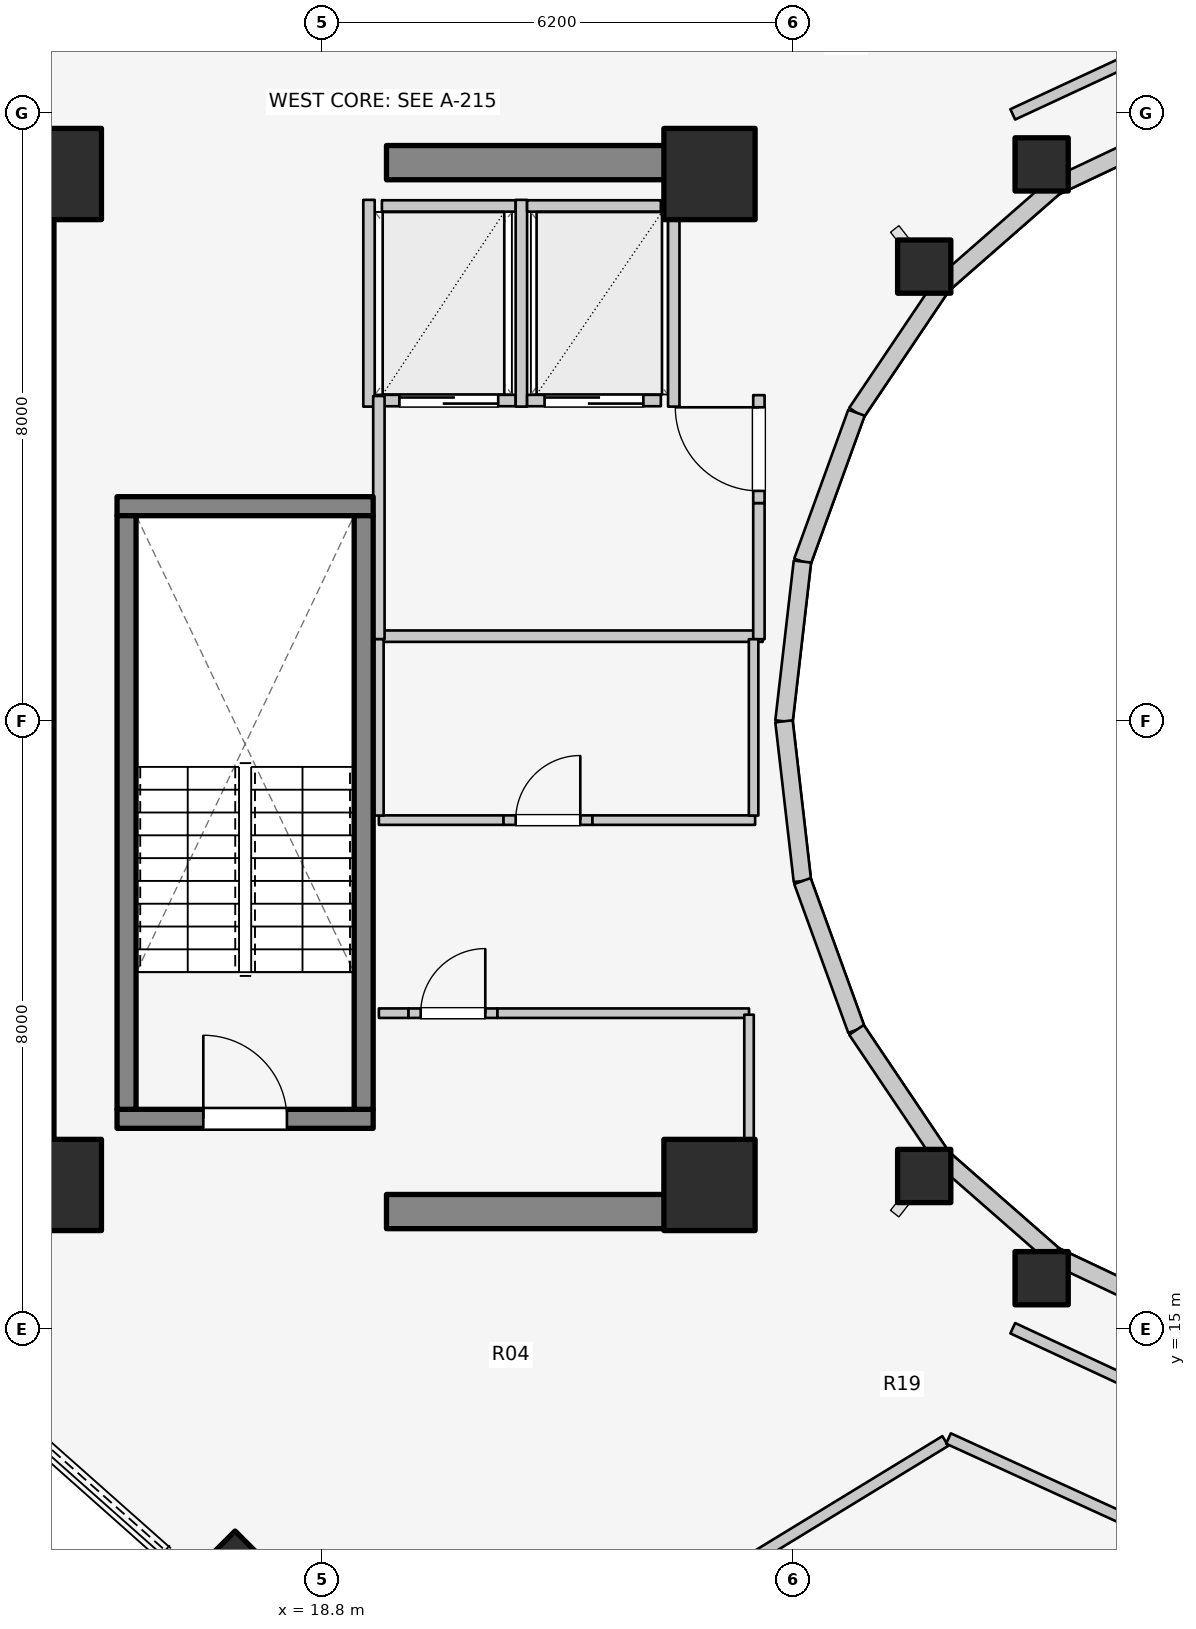
"""IFC4 building model, lengths in metres.
Left out: names, types, materials, properties, quantities, classifications, styles, units other than length and angle.
Written with IfcOpenShell. Run it as: python <this file> out.ifc"""

import sys

from ifc_helpers import new_model, si_unit, direction, frame, frame_2d, origin, origin_2d, place, context, subcontext, project, spatial, rectangle, i_section, extrude, element, fill, save


model = new_model("IFC4")
c1 = context("Model", 3, precision=1e-05, world=origin(), true_north=direction((0.0, 1.0)))
c2 = subcontext(c1, "Body", "Model", "MODEL_VIEW")
j1 = project(units=[si_unit("LENGTHUNIT", "METRE"), si_unit("PLANEANGLEUNIT", "RADIAN")], contexts=[c1])
p1 = place(None, origin())
s1 = spatial("IfcSite", under=j1, at=p1, CompositionType="ELEMENT")
p2 = place(p1, origin())
s2 = spatial("IfcBuilding", under=s1, at=p2, CompositionType="ELEMENT")
p3 = place(p2, frame((0.0, 0.0, 263.6)))
s3 = spatial("IfcBuildingStorey", under=s2, at=p3, CompositionType="ELEMENT", Elevation=263.6)
p4 = place(p3, frame((15.05, 17.05, 0.0), z_axis=(0.0, 0.0, 1.0), x_axis=(0.0, 1.0, 0.0)))
e1 = element("IfcWall", 1, at=p4, inside=s3, PredefinedType="SHEAR", context=c2, shape_type="SweptSolid", body=[
    extrude(rectangle(XDim=12.8, YDim=0.45, at=frame_2d((6.4, 0.0))), origin(), (0.0, 0.0, 1.0), 3.2),
])
for number, where, z_axis, x_axis in (
    (2, (19.65, 16.55, 0.0), (0.0, 0.0, 1.0), (1.0, 0.0, 0.0)),
    (3, (19.65, 30.35, 0.0), (0.0, 0.0, 1.0), (1.0, 0.0, 0.0)),
):
    element("IfcWall", number, at=place(p3, frame(where, z_axis=z_axis, x_axis=x_axis)), inside=s3, PredefinedType="SHEAR", context=c2, shape_type="SweptSolid", body=[
        extrude(rectangle(XDim=4.5, YDim=0.45, at=frame_2d((2.25, 0.0))), origin(), (0.0, 0.0, 1.0), 3.2),
    ])
p5 = place(p3, frame((16.105, 17.77, 0.0), z_axis=(0.0, 0.0, 1.0), x_axis=(1.0, 0.0, 0.0)))
e4 = element("IfcWall", 4, at=p5, inside=s3, PredefinedType="SOLIDWALL", context=c2, shape_type="SweptSolid", body=[
    extrude(rectangle(XDim=3.37, YDim=0.25, at=frame_2d((1.685, 0.0))), origin(), (0.0, 0.0, 1.0), 3.2),
])
p6 = place(p5, frame((1.135, 0.0, 0.0)))
e5 = element("IfcOpeningElement", 5, at=p6, cuts=e4, PredefinedType="OPENING", context=c2, shape_type="SweptSolid", body=[
    extrude(rectangle(XDim=1.1, YDim=2.1, at=frame_2d((0.55, 1.05))), frame((0.0, 0.135, 0.0), z_axis=(0.0, -1.0, 0.0), x_axis=(1.0, 0.0, 0.0)), (0.0, 0.0, 1.0), 0.27),
])
p7 = place(p3, frame((16.105, 25.83, 0.0), z_axis=(0.0, 0.0, 1.0), x_axis=(1.0, 0.0, 0.0)))
e6 = element("IfcWall", 6, at=p7, inside=s3, PredefinedType="SOLIDWALL", context=c2, shape_type="SweptSolid", body=[
    extrude(rectangle(XDim=3.37, YDim=0.25, at=frame_2d((1.685, 0.0))), origin(), (0.0, 0.0, 1.0), 3.2),
])
for number, where, z_axis, x_axis in (
    (7, (16.23, 17.895, 0.0), (0.0, 0.0, 1.0), (0.0, 1.0, 0.0)),
    (8, (19.35, 17.895, 0.0), (0.0, 0.0, 1.0), (0.0, 1.0, 0.0)),
):
    element("IfcWall", number, at=place(p3, frame(where, z_axis=z_axis, x_axis=x_axis)), inside=s3, PredefinedType="SOLIDWALL", context=c2, shape_type="SweptSolid", body=[
        extrude(rectangle(XDim=7.81, YDim=0.25, at=frame_2d((3.905, 0.0))), origin(), (0.0, 0.0, 1.0), 3.2),
    ])
for number, where, z_axis, x_axis in (
    (9, (15.3, 16.9, 0.0), (0.0, 0.0, 1.0), (1.0, 0.0, 0.0)),
    (10, (23.9, 16.9, 0.0), (0.0, 0.0, 1.0), (1.0, 0.0, 0.0)),
    (11, (23.9, 30.2, 0.0), (0.0, 0.0, 1.0), (1.0, 0.0, 0.0)),
    (12, (15.3, 30.2, 0.0), (0.0, 0.0, 1.0), (1.0, 0.0, 0.0)),
):
    element("IfcColumn", number, at=place(p3, frame(where, z_axis=z_axis, x_axis=x_axis)), inside=s3, PredefinedType="COLUMN", context=c2, shape_type="SweptSolid", body=[
        extrude(rectangle(XDim=1.2, YDim=1.2, at=origin_2d()), origin(), (0.0, 0.0, 1.0), 3.2),
    ])
for number, where, z_axis, x_axis in (
    (13, (28.27, 30.327, 0.0), (0.0, 0.0, 1.0), (1.0, 0.0, 0.0)),
    (14, (26.725, 28.982, 0.0), (0.0, 0.0, 1.0), (1.0, 0.0, 0.0)),
    (15, (26.725, 17.018, 0.0), (0.0, 0.0, 1.0), (1.0, 0.0, 0.0)),
):
    element("IfcColumn", number, at=place(p3, frame(where, z_axis=z_axis, x_axis=x_axis)), inside=s3, PredefinedType="COLUMN", context=c2, shape_type="SweptSolid", body=[
        extrude(rectangle(XDim=0.7, YDim=0.7, at=origin_2d()), origin(), (0.0, 0.0, 1.0), 3.2),
    ])
p8 = place(p3, frame((17.667, 12.048, 0.0), z_axis=(0.0, 0.0, 1.0), x_axis=(-0.707106781187, -0.707106781187, 0.0)))
e16 = element("IfcColumn", 16, at=p8, inside=s3, PredefinedType="COLUMN", context=c2, shape_type="SweptSolid", body=[
    extrude(i_section(OverallWidth=0.412, OverallDepth=0.435, WebThickness=0.036, FlangeThickness=0.057, FilletRadius=0.025, at=origin_2d()), origin(), (0.0, 0.0, 1.0), 3.2),
])
p9 = place(p3, frame((28.27, 15.673, 0.0), z_axis=(0.0, 0.0, 1.0), x_axis=(1.0, 0.0, 0.0)))
e17 = element("IfcColumn", 17, at=p9, inside=s3, PredefinedType="COLUMN", context=c2, shape_type="SweptSolid", body=[
    extrude(rectangle(XDim=0.7, YDim=0.7, at=origin_2d()), origin(), (0.0, 0.0, 1.0), 3.2),
])
p10 = place(p3, frame((30.157, 30.843, 0.0), z_axis=(0.0, 0.0, 1.0), x_axis=(-0.904179699603, -0.427152280606, 0.0)))
e18 = element("IfcWall", 18, at=p10, inside=s3, PredefinedType="STANDARD", context=c2, shape_type="SweptSolid", body=[
    extrude(rectangle(XDim=1.899, YDim=0.23, at=frame_2d((0.95, 0.0))), origin(), (0.0, 0.0, 1.0), 1.32),
])
p11 = place(p3, frame((28.44, 30.032, 0.0), z_axis=(0.0, 0.0, 1.0), x_axis=(-0.752576694707, -0.658504607869, 0.0)))
e19 = element("IfcWall", 19, at=p11, inside=s3, PredefinedType="STANDARD", context=c2, shape_type="SweptSolid", body=[
    extrude(rectangle(XDim=1.959, YDim=0.23, at=frame_2d((0.98, 0.0))), origin(), (0.0, 0.0, 1.0), 1.32),
])
p12 = place(p3, frame((26.965, 28.742, 0.0), z_axis=(0.0, 0.0, 1.0), x_axis=(-0.558197800898, -0.829707909492, 0.0)))
e20 = element("IfcWall", 20, at=p12, inside=s3, PredefinedType="STANDARD", context=c2, shape_type="SweptSolid", body=[
    extrude(rectangle(XDim=2.027, YDim=0.23, at=frame_2d((1.013, 0.0))), origin(), (0.0, 0.0, 1.0), 1.32),
])
p13 = place(p3, frame((25.834, 27.06, 0.0), z_axis=(0.0, 0.0, 1.0), x_axis=(-0.341423187295, -0.93990968033, 0.0)))
e21 = element("IfcWall", 21, at=p13, inside=s3, PredefinedType="STANDARD", context=c2, shape_type="SweptSolid", body=[
    extrude(rectangle(XDim=2.084, YDim=0.23, at=frame_2d((1.042, 0.0))), origin(), (0.0, 0.0, 1.0), 2.9),
])
for number, where, z_axis, x_axis in (
    (22, (25.123, 25.102, 0.0), (0.0, 0.0, 1.0), (-0.115, -0.993, 0.0)),
    (23, (24.88, 23.0, 0.0), (0.0, 0.0, 1.0), (0.115, -0.993, 0.0)),
):
    element("IfcWall", number, at=place(p3, frame(where, z_axis=z_axis, x_axis=x_axis)), inside=s3, PredefinedType="STANDARD", context=c2, shape_type="SweptSolid", body=[
        extrude(rectangle(XDim=2.115, YDim=0.23, at=frame_2d((1.058, 0.0))), origin(), (0.0, 0.0, 1.0), 2.9),
    ])
p14 = place(p3, frame((25.123, 20.898, 0.0), z_axis=(0.0, 0.0, 1.0), x_axis=(0.341423187295, -0.93990968033, 0.0)))
e24 = element("IfcWall", 24, at=p14, inside=s3, PredefinedType="STANDARD", context=c2, shape_type="SweptSolid", body=[
    extrude(rectangle(XDim=2.084, YDim=0.23, at=frame_2d((1.042, 0.0))), origin(), (0.0, 0.0, 1.0), 2.9),
])
p15 = place(p3, frame((25.834, 18.94, 0.0), z_axis=(0.0, 0.0, 1.0), x_axis=(0.558197800898, -0.829707909492, 0.0)))
e25 = element("IfcWall", 25, at=p15, inside=s3, PredefinedType="STANDARD", context=c2, shape_type="SweptSolid", body=[
    extrude(rectangle(XDim=2.027, YDim=0.23, at=frame_2d((1.013, 0.0))), origin(), (0.0, 0.0, 1.0), 1.32),
])
p16 = place(p3, frame((26.965, 17.258, 0.0), z_axis=(0.0, 0.0, 1.0), x_axis=(0.752576694707, -0.658504607869, 0.0)))
e26 = element("IfcWall", 26, at=p16, inside=s3, PredefinedType="STANDARD", context=c2, shape_type="SweptSolid", body=[
    extrude(rectangle(XDim=1.959, YDim=0.23, at=frame_2d((0.98, 0.0))), origin(), (0.0, 0.0, 1.0), 1.32),
])
p17 = place(p3, frame((28.44, 15.968, 0.0), z_axis=(0.0, 0.0, 1.0), x_axis=(0.904179699603, -0.427152280606, 0.0)))
e27 = element("IfcWall", 27, at=p17, inside=s3, PredefinedType="STANDARD", context=c2, shape_type="SweptSolid", body=[
    extrude(rectangle(XDim=1.899, YDim=0.23, at=frame_2d((0.95, 0.0))), origin(), (0.0, 0.0, 1.0), 1.32),
])
p18 = place(p3, frame((17.254, 34.365, 0.0), z_axis=(0.0, 0.0, 1.0), x_axis=(-0.748042849834, -0.663650431185, 0.0)))
e28 = element("IfcWall", 28, at=p18, inside=s3, PredefinedType="STANDARD", context=c2, shape_type="SweptSolid", body=[
    extrude(rectangle(XDim=4.059, YDim=0.26, at=frame_2d((2.029, 0.0))), origin(), (0.0, 0.0, 1.0), 1.32),
])
p19 = place(p3, frame((19.59, 27.22, 0.0), z_axis=(0.0, 0.0, 1.0), x_axis=(1.0, 0.0, 0.0)))
e29 = element("IfcWall", 29, at=p19, inside=s3, PredefinedType="SOLIDWALL", context=c2, shape_type="SweptSolid", body=[
    extrude(rectangle(XDim=1.76, YDim=0.15, at=frame_2d((0.88, 0.0))), origin(), (0.0, 0.0, 1.0), 2.915),
])
p20 = place(p19, frame((0.23, 0.0, 0.0)))
e30 = element("IfcOpeningElement", 30, at=p20, cuts=e29, PredefinedType="OPENING", context=c2, shape_type="SweptSolid", body=[
    extrude(rectangle(XDim=1.3, YDim=2.1, at=frame_2d((0.65, 1.05))), frame((0.0, 0.085, 0.0), z_axis=(0.0, -1.0, 0.0), x_axis=(1.0, 0.0, 0.0)), (0.0, 0.0, 1.0), 0.17),
])
p21 = place(p3, frame((19.59, 29.78, 0.0), z_axis=(0.0, 0.0, 1.0), x_axis=(1.0, 0.0, 0.0)))
e31 = element("IfcWall", 31, at=p21, inside=s3, PredefinedType="SOLIDWALL", context=c2, shape_type="SweptSolid", body=[
    extrude(rectangle(XDim=1.76, YDim=0.15, at=frame_2d((0.88, 0.0))), origin(), (0.0, 0.0, 1.0), 2.915),
])
for number, where, z_axis, x_axis in (
    (32, (19.42, 27.14, 0.0), (0.0, 0.0, 1.0), (0.0, 1.0, 0.0)),
    (33, (21.425, 27.14, 0.0), (0.0, 0.0, 1.0), (0.0, 1.0, 0.0)),
):
    element("IfcWall", number, at=place(p3, frame(where, z_axis=z_axis, x_axis=x_axis)), inside=s3, PredefinedType="SOLIDWALL", context=c2, shape_type="SweptSolid", body=[
        extrude(rectangle(XDim=2.72, YDim=0.15, at=frame_2d((1.36, 0.0))), origin(), (0.0, 0.0, 1.0), 2.915),
    ])
p22 = place(p3, frame((21.5, 27.22, 0.0), z_axis=(0.0, 0.0, 1.0), x_axis=(1.0, 0.0, 0.0)))
e34 = element("IfcWall", 34, at=p22, inside=s3, PredefinedType="SOLIDWALL", context=c2, shape_type="SweptSolid", body=[
    extrude(rectangle(XDim=1.76, YDim=0.15, at=frame_2d((0.88, 0.0))), origin(), (0.0, 0.0, 1.0), 2.915),
])
p23 = place(p22, frame((0.23, 0.0, 0.0)))
e35 = element("IfcOpeningElement", 35, at=p23, cuts=e34, PredefinedType="OPENING", context=c2, shape_type="SweptSolid", body=[
    extrude(rectangle(XDim=1.3, YDim=2.1, at=frame_2d((0.65, 1.05))), frame((0.0, 0.085, 0.0), z_axis=(0.0, -1.0, 0.0), x_axis=(1.0, 0.0, 0.0)), (0.0, 0.0, 1.0), 0.17),
])
p24 = place(p3, frame((21.5, 29.78, 0.0), z_axis=(0.0, 0.0, 1.0), x_axis=(1.0, 0.0, 0.0)))
e36 = element("IfcWall", 36, at=p24, inside=s3, PredefinedType="SOLIDWALL", context=c2, shape_type="SweptSolid", body=[
    extrude(rectangle(XDim=1.76, YDim=0.15, at=frame_2d((0.88, 0.0))), origin(), (0.0, 0.0, 1.0), 2.915),
])
p25 = place(p3, frame((23.43, 27.14, 0.0), z_axis=(0.0, 0.0, 1.0), x_axis=(0.0, 1.0, 0.0)))
e37 = element("IfcWall", 37, at=p25, inside=s3, PredefinedType="SOLIDWALL", context=c2, shape_type="SweptSolid", body=[
    extrude(rectangle(XDim=2.72, YDim=0.15, at=frame_2d((1.36, 0.0))), origin(), (0.0, 0.0, 1.0), 1.57),
])
p26 = place(p3, frame((19.52, 24.12, 0.0), z_axis=(0.0, 0.0, 1.0), x_axis=(1.0, 0.0, 0.0)))
e38 = element("IfcWall", 38, at=p26, inside=s3, PredefinedType="PARTITIONING", context=c2, shape_type="SweptSolid", body=[
    extrude(rectangle(XDim=5.08, YDim=0.15, at=frame_2d((2.54, 0.0))), origin(), (0.0, 0.0, 1.0), 1.57),
])
p27 = place(p3, frame((19.55, 24.08, 0.0), z_axis=(0.0, 0.0, 1.0), x_axis=(0.0, 1.0, 0.0)))
e39 = element("IfcWall", 39, at=p27, inside=s3, PredefinedType="PARTITIONING", context=c2, shape_type="SweptSolid", body=[
    extrude(rectangle(XDim=3.2, YDim=0.15, at=frame_2d((1.6, 0.0))), origin(), (0.0, 0.0, 1.0), 2.915),
])
p28 = place(p3, frame((24.55, 24.08, 0.0), z_axis=(0.0, 0.0, 1.0), x_axis=(0.0, 1.0, 0.0)))
e40 = element("IfcWall", 40, at=p28, inside=s3, PredefinedType="PARTITIONING", context=c2, shape_type="SweptSolid", body=[
    extrude(rectangle(XDim=1.791, YDim=0.15, at=frame_2d((0.896, 0.0))), origin(), (0.0, 0.0, 1.0), 1.57),
])
p29 = place(p3, frame((24.55, 25.871, 0.0), z_axis=(0.0, 0.0, 1.0), x_axis=(0.0, 1.0, 0.0)))
e41 = element("IfcWall", 41, at=p29, inside=s3, PredefinedType="PARTITIONING", context=c2, shape_type="SweptSolid", body=[
    extrude(rectangle(XDim=1.42, YDim=0.15, at=frame_2d((0.71, 0.0))), origin(), (0.0, 0.0, 1.0), 2.16),
])
p30 = place(p29, frame((0.16, 0.0, 0.0)))
e42 = element("IfcOpeningElement", 42, at=p30, cuts=e41, PredefinedType="OPENING", context=c2, shape_type="SweptSolid", body=[
    extrude(rectangle(XDim=1.1, YDim=2.1, at=frame_2d((0.55, 1.05))), frame((0.0, 0.085, 0.0), z_axis=(0.0, -1.0, 0.0), x_axis=(1.0, 0.0, 0.0)), (0.0, 0.0, 1.0), 0.17),
])
p31 = place(p3, frame((19.55, 19.16, 0.0), z_axis=(0.0, 0.0, 1.0), x_axis=(1.0, 0.0, 0.0)))
e43 = element("IfcWall", 43, at=p31, inside=s3, PredefinedType="PARTITIONING", context=c2, shape_type="SweptSolid", body=[
    extrude(rectangle(XDim=0.39, YDim=0.125, at=frame_2d((0.195, 0.0))), origin(), (0.0, 0.0, 1.0), 2.22),
])
p32 = place(p3, frame((19.94, 19.16, 0.0), z_axis=(0.0, 0.0, 1.0), x_axis=(1.0, 0.0, 0.0)))
e44 = element("IfcWall", 44, at=p32, inside=s3, PredefinedType="PARTITIONING", context=c2, shape_type="SweptSolid", body=[
    extrude(rectangle(XDim=1.17, YDim=0.125, at=frame_2d((0.585, 0.0))), origin(), (0.0, 0.0, 1.0), 2.915),
])
p33 = place(p32, frame((0.16, 0.0, 0.0)))
e45 = element("IfcOpeningElement", 45, at=p33, cuts=e44, PredefinedType="OPENING", context=c2, shape_type="SweptSolid", body=[
    extrude(rectangle(XDim=0.85, YDim=2.05, at=frame_2d((0.425, 1.025))), frame((0.0, 0.073, 0.0), z_axis=(0.0, -1.0, 0.0), x_axis=(1.0, 0.0, 0.0)), (0.0, 0.0, 1.0), 0.145),
])
p34 = place(p3, frame((21.11, 19.16, 0.0), z_axis=(0.0, 0.0, 1.0), x_axis=(1.0, 0.0, 0.0)))
e46 = element("IfcWall", 46, at=p34, inside=s3, PredefinedType="PARTITIONING", context=c2, shape_type="SweptSolid", body=[
    extrude(rectangle(XDim=3.31, YDim=0.125, at=frame_2d((1.655, 0.0))), origin(), (0.0, 0.0, 1.0), 1.57),
])
p35 = place(p3, frame((24.42, 17.1, 0.0), z_axis=(0.0, 0.0, 1.0), x_axis=(0.0, 1.0, 0.0)))
e47 = element("IfcWall", 47, at=p35, inside=s3, PredefinedType="PARTITIONING", context=c2, shape_type="SweptSolid", body=[
    extrude(rectangle(XDim=2.04, YDim=0.125, at=frame_2d((1.02, 0.0))), origin(), (0.0, 0.0, 1.0), 1.57),
])
p36 = place(p3, frame((19.55, 21.7, 0.0), z_axis=(0.0, 0.0, 1.0), x_axis=(1.0, 0.0, 0.0)))
e48 = element("IfcWall", 48, at=p36, inside=s3, PredefinedType="PARTITIONING", context=c2, shape_type="SweptSolid", body=[
    extrude(rectangle(XDim=1.64, YDim=0.125, at=frame_2d((0.82, 0.0))), origin(), (0.0, 0.0, 1.0), 2.915),
])
p37 = place(p3, frame((21.19, 21.7, 0.0), z_axis=(0.0, 0.0, 1.0), x_axis=(1.0, 0.0, 0.0)))
e49 = element("IfcWall", 49, at=p37, inside=s3, PredefinedType="PARTITIONING", context=c2, shape_type="SweptSolid", body=[
    extrude(rectangle(XDim=1.17, YDim=0.125, at=frame_2d((0.585, 0.0))), origin(), (0.0, 0.0, 1.0), 2.915),
])
p38 = place(p37, frame((0.16, 0.0, 0.0)))
e50 = element("IfcOpeningElement", 50, at=p38, cuts=e49, PredefinedType="OPENING", context=c2, shape_type="SweptSolid", body=[
    extrude(rectangle(XDim=0.85, YDim=2.05, at=frame_2d((0.425, 1.025))), frame((0.0, 0.073, 0.0), z_axis=(0.0, -1.0, 0.0), x_axis=(1.0, 0.0, 0.0)), (0.0, 0.0, 1.0), 0.145),
])
p39 = place(p3, frame((22.36, 21.7, 0.0), z_axis=(0.0, 0.0, 1.0), x_axis=(1.0, 0.0, 0.0)))
e51 = element("IfcWall", 51, at=p39, inside=s3, PredefinedType="PARTITIONING", context=c2, shape_type="SweptSolid", body=[
    extrude(rectangle(XDim=2.14, YDim=0.125, at=frame_2d((1.07, 0.0))), origin(), (0.0, 0.0, 1.0), 1.57),
])
for number, where, z_axis, x_axis in (
    (52, (19.55, 21.76, 0.0), (0.0, 0.0, 1.0), (0.0, 1.0, 0.0)),
    (53, (24.48, 21.76, 0.0), (0.0, 0.0, 1.0), (0.0, 1.0, 0.0)),
):
    element("IfcWall", number, at=place(p3, frame(where, z_axis=z_axis, x_axis=x_axis)), inside=s3, PredefinedType="PARTITIONING", context=c2, shape_type="SweptSolid", body=[
        extrude(rectangle(XDim=2.32, YDim=0.125, at=frame_2d((1.16, 0.0))), origin(), (0.0, 0.0, 1.0), 2.915),
    ])
for number, where, z_axis, x_axis in (
    (54, (29.873, 31.906, 0.0), (0.0, 0.0, 1.0), (-0.907, -0.421, 0.0)),
    (55, (27.89, 15.015, 0.0), (0.0, 0.0, 1.0), (0.907, -0.421, 0.0)),
):
    element("IfcWall", number, at=place(p3, frame(where, z_axis=z_axis, x_axis=x_axis)), inside=s3, PredefinedType="PARTITIONING", context=c2, shape_type="SweptSolid", body=[
        extrude(rectangle(XDim=2.186, YDim=0.15, at=frame_2d((1.093, 0.0))), origin(), (0.0, 0.0, 1.0), 1.32),
    ])
p40 = place(p3, frame((27.003, 13.531, 0.0), z_axis=(0.0, 0.0, 1.0), x_axis=(-0.853465247428, -0.521149759122, 0.0)))
e56 = element("IfcWall", 56, at=p40, inside=s3, PredefinedType="PARTITIONING", context=c2, shape_type="SweptSolid", body=[
    extrude(rectangle(XDim=6.842, YDim=0.15, at=frame_2d((3.421, 0.0))), origin(), (0.0, 0.0, 1.0), 1.32),
])
p41 = place(p3, frame((27.044, 13.564, 0.0), z_axis=(0.0, 0.0, 1.0), x_axis=(0.909736731002, -0.415185597373, 0.0)))
e57 = element("IfcWall", 57, at=p41, inside=s3, PredefinedType="PARTITIONING", context=c2, shape_type="SweptSolid", body=[
    extrude(rectangle(XDim=2.633, YDim=0.15, at=frame_2d((1.317, 0.0))), origin(), (0.0, 0.0, 1.0), 1.32),
])
p42 = place(p6, origin())
e58 = element("IfcDoor", 58, at=p42, inside=s3, OperationType="SINGLE_SWING_LEFT", PredefinedType="DOOR", context=c2, shape_type="SweptSolid", body=[
    extrude(rectangle(XDim=1.1, YDim=2.1, at=frame_2d((0.55, 1.05))), frame((0.0, 0.025, 0.0), z_axis=(0.0, -1.0, 0.0), x_axis=(1.0, 0.0, 0.0)), (0.0, 0.0, 1.0), 0.05),
])
fill(e5, e58)
p43 = place(p20, origin())
e59 = element("IfcDoor", 59, at=p43, inside=s3, OperationType="DOUBLE_DOOR_SLIDING", PredefinedType="DOOR", context=c2, shape_type="SweptSolid", body=[
    extrude(rectangle(XDim=1.3, YDim=2.1, at=frame_2d((0.65, 1.05))), frame((0.0, 0.025, 0.0), z_axis=(0.0, -1.0, 0.0), x_axis=(1.0, 0.0, 0.0)), (0.0, 0.0, 1.0), 0.05),
])
fill(e30, e59)
p44 = place(p23, origin())
e60 = element("IfcDoor", 60, at=p44, inside=s3, OperationType="DOUBLE_DOOR_SLIDING", PredefinedType="DOOR", context=c2, shape_type="SweptSolid", body=[
    extrude(rectangle(XDim=1.3, YDim=2.1, at=frame_2d((0.65, 1.05))), frame((0.0, 0.025, 0.0), z_axis=(0.0, -1.0, 0.0), x_axis=(1.0, 0.0, 0.0)), (0.0, 0.0, 1.0), 0.05),
])
fill(e35, e60)
p45 = place(p30, origin())
e61 = element("IfcDoor", 61, at=p45, inside=s3, OperationType="SINGLE_SWING_RIGHT", PredefinedType="DOOR", context=c2, shape_type="SweptSolid", body=[
    extrude(rectangle(XDim=1.1, YDim=2.1, at=frame_2d((0.55, 1.05))), frame((0.0, 0.025, 0.0), z_axis=(0.0, -1.0, 0.0), x_axis=(1.0, 0.0, 0.0)), (0.0, 0.0, 1.0), 0.05),
])
fill(e42, e61)
p46 = place(p33, origin())
e62 = element("IfcDoor", 62, at=p46, inside=s3, OperationType="SINGLE_SWING_RIGHT", PredefinedType="DOOR", context=c2, shape_type="SweptSolid", body=[
    extrude(rectangle(XDim=0.85, YDim=2.05, at=frame_2d((0.425, 1.025))), frame((0.0, 0.025, 0.0), z_axis=(0.0, -1.0, 0.0), x_axis=(1.0, 0.0, 0.0)), (0.0, 0.0, 1.0), 0.05),
])
fill(e45, e62)
p47 = place(p38, origin())
e63 = element("IfcDoor", 63, at=p47, inside=s3, OperationType="SINGLE_SWING_RIGHT", PredefinedType="DOOR", context=c2, shape_type="SweptSolid", body=[
    extrude(rectangle(XDim=0.85, YDim=2.05, at=frame_2d((0.425, 1.025))), frame((0.0, 0.025, 0.0), z_axis=(0.0, -1.0, 0.0), x_axis=(1.0, 0.0, 0.0)), (0.0, 0.0, 1.0), 0.05),
])
fill(e50, e63)
save(model, sys.argv[1])
